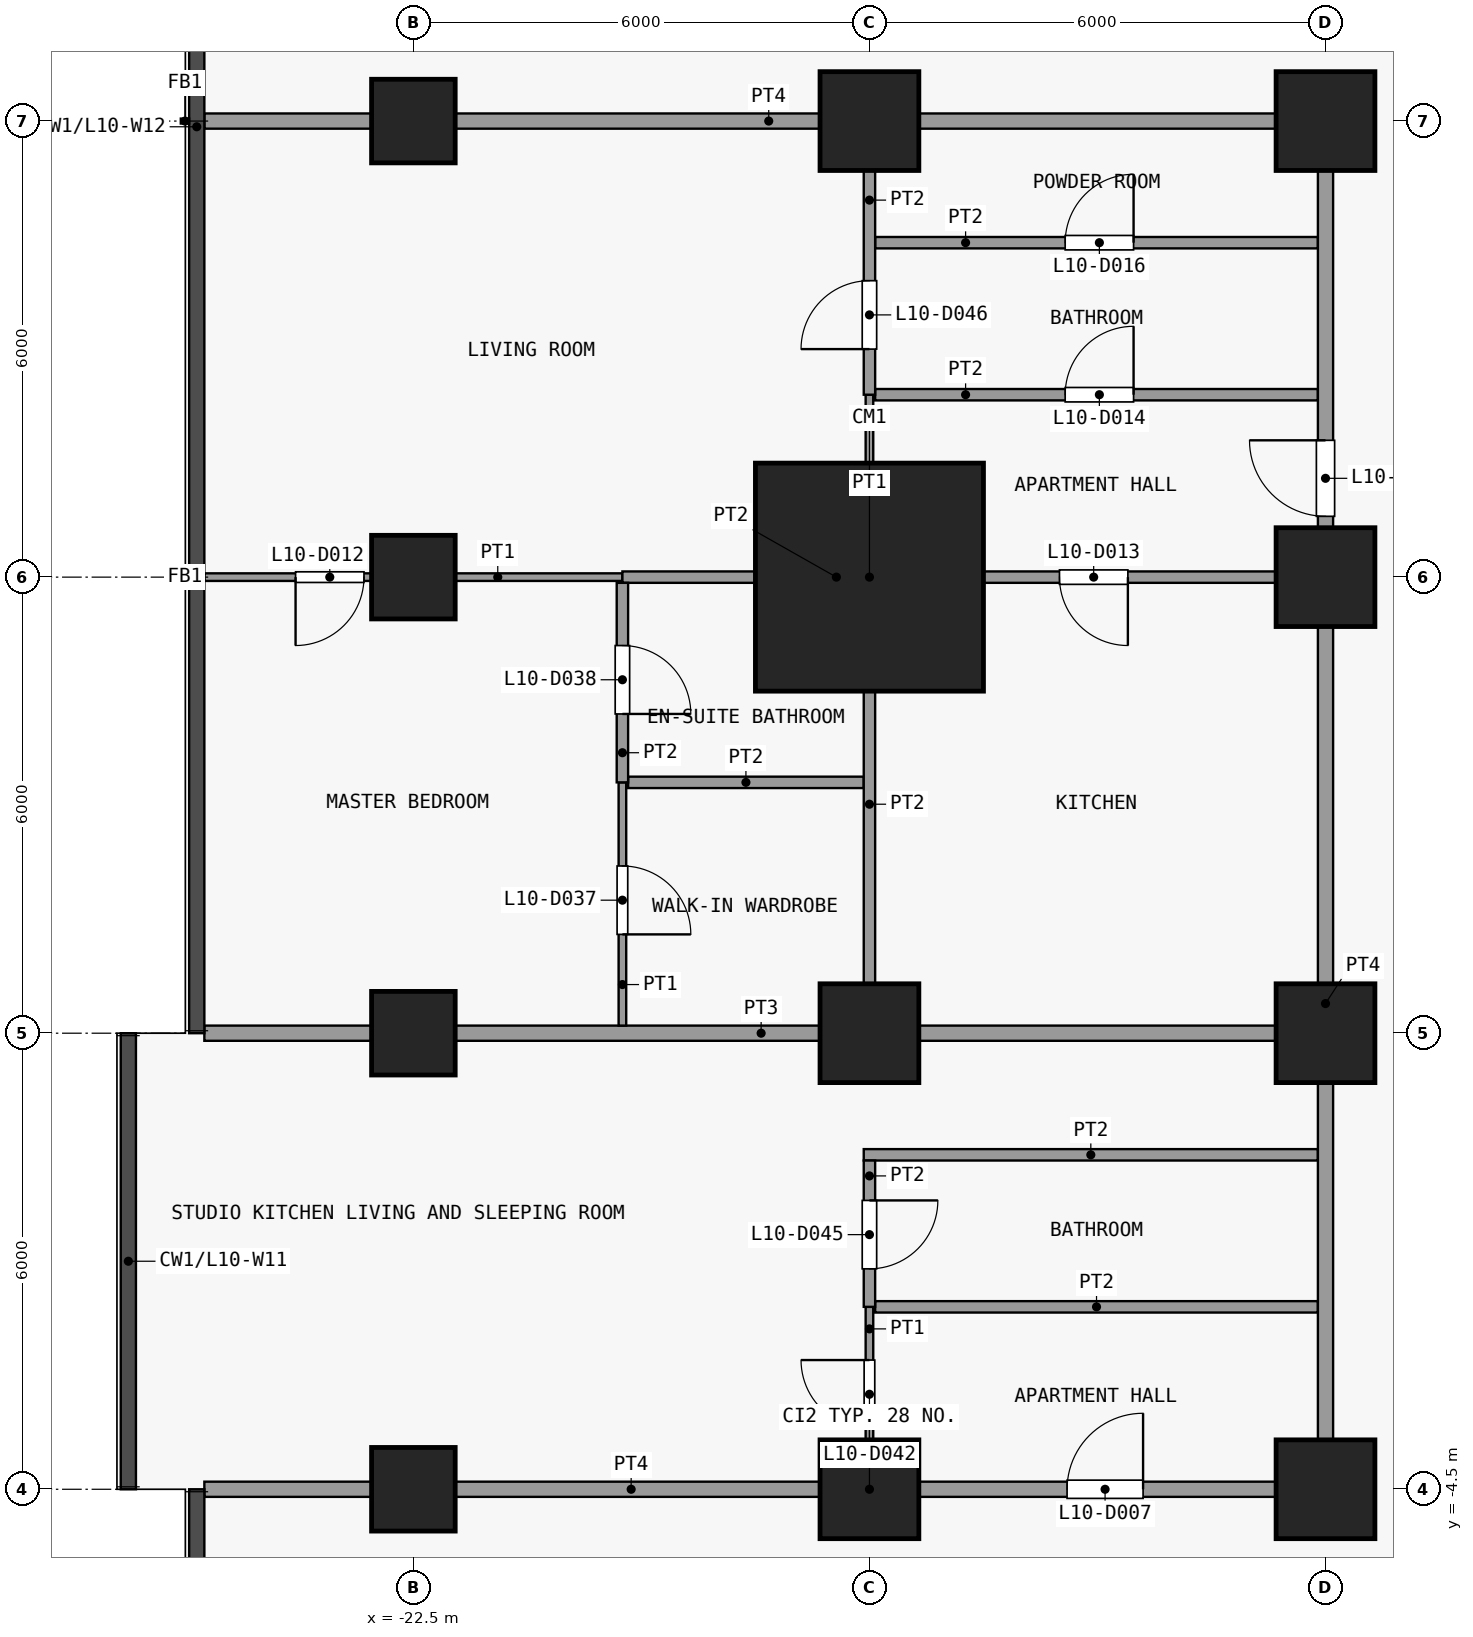
"""IFC4 building model, lengths in metres.
Left out: names, types, materials, properties, quantities, classifications, styles, units other than length and angle.
Written with IfcOpenShell. Run it as: python <this file> out.ifc"""

import sys

from ifc_helpers import new_model, si_unit, direction, frame, frame_2d, origin, origin_2d, place, context, subcontext, project, spatial, rectangle, extrude, element, fill, save


model = new_model("IFC4")
c1 = context("Model", 3, precision=1e-05, world=origin(), true_north=direction((0.0, 1.0)))
c2 = subcontext(c1, "Body", "Model", "MODEL_VIEW")
j1 = project(units=[si_unit("LENGTHUNIT", "METRE"), si_unit("PLANEANGLEUNIT", "RADIAN")], contexts=[c1])
p1 = place(None, origin())
s1 = spatial("IfcSite", under=j1, at=p1, CompositionType="ELEMENT")
p2 = place(p1, origin())
s2 = spatial("IfcBuilding", under=s1, at=p2, CompositionType="ELEMENT")
p3 = place(p2, frame((0.0, 0.0, 46.9)))
s3 = spatial("IfcBuildingStorey", under=s2, at=p3, CompositionType="ELEMENT", Elevation=46.9)
for number, where, z_axis, x_axis in (
    (1, (-22.5, -4.5, 0.0), (0.0, 0.0, 1.0), (1.0, 0.0, 0.0)),
    (2, (-22.5, 1.5, 0.0), (0.0, 0.0, 1.0), (1.0, 0.0, 0.0)),
    (3, (-22.5, 7.5, 0.0), (0.0, 0.0, 1.0), (1.0, 0.0, 0.0)),
    (4, (-22.5, 13.5, 0.0), (0.0, 0.0, 1.0), (1.0, 0.0, 0.0)),
):
    element("IfcColumn", number, at=place(p3, frame(where, z_axis=z_axis, x_axis=x_axis)), inside=s3, PredefinedType="COLUMN", context=c2, shape_type="SweptSolid", body=[
        extrude(rectangle(XDim=1.1, YDim=1.1, at=origin_2d()), origin(), (0.0, 0.0, 1.0), 3.6),
    ])
for number, where, z_axis, x_axis in (
    (5, (-16.5, -4.5, 0.0), (0.0, 0.0, 1.0), (1.0, 0.0, 0.0)),
    (6, (-16.5, 1.5, 0.0), (0.0, 0.0, 1.0), (1.0, 0.0, 0.0)),
):
    element("IfcColumn", number, at=place(p3, frame(where, z_axis=z_axis, x_axis=x_axis)), inside=s3, PredefinedType="COLUMN", context=c2, shape_type="SweptSolid", body=[
        extrude(rectangle(XDim=1.3, YDim=1.3, at=origin_2d()), origin(), (0.0, 0.0, 1.0), 3.6),
    ])
p4 = place(p3, frame((-16.5, 7.5, 0.0), z_axis=(0.0, 0.0, 1.0), x_axis=(1.0, 0.0, 0.0)))
e7 = element("IfcColumn", 7, at=p4, inside=s3, PredefinedType="COLUMN", context=c2, shape_type="SweptSolid", body=[
    extrude(rectangle(XDim=3.0, YDim=3.0, at=origin_2d()), origin(), (0.0, 0.0, 1.0), 3.6),
])
for number, where, z_axis, x_axis in (
    (8, (-16.5, 13.5, 0.0), (0.0, 0.0, 1.0), (1.0, 0.0, 0.0)),
    (9, (-10.5, -4.5, 0.0), (0.0, 0.0, 1.0), (1.0, 0.0, 0.0)),
    (10, (-10.5, 1.5, 0.0), (0.0, 0.0, 1.0), (1.0, 0.0, 0.0)),
    (11, (-10.5, 7.5, 0.0), (0.0, 0.0, 1.0), (1.0, 0.0, 0.0)),
    (12, (-10.5, 13.5, 0.0), (0.0, 0.0, 1.0), (1.0, 0.0, 0.0)),
):
    element("IfcColumn", number, at=place(p3, frame(where, z_axis=z_axis, x_axis=x_axis)), inside=s3, PredefinedType="COLUMN", context=c2, shape_type="SweptSolid", body=[
        extrude(rectangle(XDim=1.3, YDim=1.3, at=origin_2d()), origin(), (0.0, 0.0, 1.0), 3.6),
    ])
p5 = place(p3, frame((-25.25, -4.5, 0.0), z_axis=(0.0, 0.0, 1.0), x_axis=(1.0, 0.0, 0.0)))
e13 = element("IfcWall", 13, at=p5, inside=s3, PredefinedType="PARTITIONING", context=c2, shape_type="SweptSolid", body=[
    extrude(rectangle(XDim=14.85, YDim=0.2, at=frame_2d((7.425, 0.0))), origin(), (0.0, 0.0, 1.0), 3.3),
])
p6 = place(p5, frame((11.35, 0.0, 0.0)))
e14 = element("IfcOpeningElement", 14, at=p6, cuts=e13, PredefinedType="OPENING", context=c2, shape_type="SweptSolid", body=[
    extrude(rectangle(XDim=1.0, YDim=2.1, at=frame_2d((0.5, 1.05))), frame((0.0, 0.11, 0.0), z_axis=(0.0, -1.0, 0.0), x_axis=(1.0, 0.0, 0.0)), (0.0, 0.0, 1.0), 0.22),
])
p7 = place(p3, frame((-16.425, -2.1, 0.0), z_axis=(0.0, 0.0, 1.0), x_axis=(1.0, 0.0, 0.0)))
e15 = element("IfcWall", 15, at=p7, inside=s3, PredefinedType="PARTITIONING", context=c2, shape_type="SweptSolid", body=[
    extrude(rectangle(XDim=5.825, YDim=0.15, at=frame_2d((2.913, 0.0))), origin(), (0.0, 0.0, 1.0), 3.3),
])
p8 = place(p3, frame((-16.575, -0.1, 0.0), z_axis=(0.0, 0.0, 1.0), x_axis=(1.0, 0.0, 0.0)))
e16 = element("IfcWall", 16, at=p8, inside=s3, PredefinedType="PARTITIONING", context=c2, shape_type="SweptSolid", body=[
    extrude(rectangle(XDim=5.975, YDim=0.15, at=frame_2d((2.987, 0.0))), origin(), (0.0, 0.0, 1.0), 3.3),
])
p9 = place(p3, frame((-25.25, 1.5, 0.0), z_axis=(0.0, 0.0, 1.0), x_axis=(1.0, 0.0, 0.0)))
e17 = element("IfcWall", 17, at=p9, inside=s3, PredefinedType="PARTITIONING", context=c2, shape_type="SweptSolid", body=[
    extrude(rectangle(XDim=14.65, YDim=0.2, at=frame_2d((7.325, 0.0))), origin(), (0.0, 0.0, 1.0), 3.3),
])
p10 = place(p3, frame((-19.675, 4.8, 0.0), z_axis=(0.0, 0.0, 1.0), x_axis=(1.0, 0.0, 0.0)))
e18 = element("IfcWall", 18, at=p10, inside=s3, PredefinedType="PARTITIONING", context=c2, shape_type="SweptSolid", body=[
    extrude(rectangle(XDim=3.1, YDim=0.15, at=frame_2d((1.55, 0.0))), origin(), (0.0, 0.0, 1.0), 3.3),
])
p11 = place(p3, frame((-25.25, 7.5, 0.0), z_axis=(0.0, 0.0, 1.0), x_axis=(1.0, 0.0, 0.0)))
e19 = element("IfcWall", 19, at=p11, inside=s3, PredefinedType="PARTITIONING", context=c2, shape_type="SweptSolid", body=[
    extrude(rectangle(XDim=5.5, YDim=0.1, at=frame_2d((2.75, 0.0))), origin(), (0.0, 0.0, 1.0), 3.3),
])
p12 = place(p11, frame((1.2, 0.0, 0.0)))
e20 = element("IfcOpeningElement", 20, at=p12, cuts=e19, PredefinedType="OPENING", context=c2, shape_type="SweptSolid", body=[
    extrude(rectangle(XDim=0.9, YDim=2.1, at=frame_2d((0.45, 1.05))), frame((0.0, 0.06, 0.0), z_axis=(0.0, -1.0, 0.0), x_axis=(1.0, 0.0, 0.0)), (0.0, 0.0, 1.0), 0.12),
])
p13 = place(p3, frame((-19.75, 7.5, 0.0), z_axis=(0.0, 0.0, 1.0), x_axis=(1.0, 0.0, 0.0)))
e21 = element("IfcWall", 21, at=p13, inside=s3, PredefinedType="PARTITIONING", context=c2, shape_type="SweptSolid", body=[
    extrude(rectangle(XDim=9.15, YDim=0.15, at=frame_2d((4.575, 0.0))), origin(), (0.0, 0.0, 1.0), 3.3),
])
p14 = place(p13, frame((5.75, 0.0, 0.0)))
e22 = element("IfcOpeningElement", 22, at=p14, cuts=e21, PredefinedType="OPENING", context=c2, shape_type="SweptSolid", body=[
    extrude(rectangle(XDim=0.9, YDim=2.1, at=frame_2d((0.45, 1.05))), frame((0.0, 0.085, 0.0), z_axis=(0.0, -1.0, 0.0), x_axis=(1.0, 0.0, 0.0)), (0.0, 0.0, 1.0), 0.17),
])
p15 = place(p3, frame((-16.425, 9.9, 0.0), z_axis=(0.0, 0.0, 1.0), x_axis=(1.0, 0.0, 0.0)))
e23 = element("IfcWall", 23, at=p15, inside=s3, PredefinedType="PARTITIONING", context=c2, shape_type="SweptSolid", body=[
    extrude(rectangle(XDim=5.825, YDim=0.15, at=frame_2d((2.913, 0.0))), origin(), (0.0, 0.0, 1.0), 3.3),
])
p16 = place(p15, frame((2.5, 0.0, 0.0)))
e24 = element("IfcOpeningElement", 24, at=p16, cuts=e23, PredefinedType="OPENING", context=c2, shape_type="SweptSolid", body=[
    extrude(rectangle(XDim=0.9, YDim=2.1, at=frame_2d((0.45, 1.05))), frame((0.0, 0.085, 0.0), z_axis=(0.0, -1.0, 0.0), x_axis=(1.0, 0.0, 0.0)), (0.0, 0.0, 1.0), 0.17),
])
p17 = place(p3, frame((-16.425, 11.9, 0.0), z_axis=(0.0, 0.0, 1.0), x_axis=(1.0, 0.0, 0.0)))
e25 = element("IfcWall", 25, at=p17, inside=s3, PredefinedType="PARTITIONING", context=c2, shape_type="SweptSolid", body=[
    extrude(rectangle(XDim=5.825, YDim=0.15, at=frame_2d((2.913, 0.0))), origin(), (0.0, 0.0, 1.0), 3.3),
])
p18 = place(p17, frame((2.5, 0.0, 0.0)))
e26 = element("IfcOpeningElement", 26, at=p18, cuts=e25, PredefinedType="OPENING", context=c2, shape_type="SweptSolid", body=[
    extrude(rectangle(XDim=0.9, YDim=2.1, at=frame_2d((0.45, 1.05))), frame((0.0, 0.085, 0.0), z_axis=(0.0, -1.0, 0.0), x_axis=(1.0, 0.0, 0.0)), (0.0, 0.0, 1.0), 0.17),
])
p19 = place(p3, frame((-25.25, 13.5, 0.0), z_axis=(0.0, 0.0, 1.0), x_axis=(1.0, 0.0, 0.0)))
e27 = element("IfcWall", 27, at=p19, inside=s3, PredefinedType="PARTITIONING", context=c2, shape_type="SweptSolid", body=[
    extrude(rectangle(XDim=14.85, YDim=0.2, at=frame_2d((7.425, 0.0))), origin(), (0.0, 0.0, 1.0), 3.3),
])
p20 = place(p3, frame((-19.75, 1.6, 0.0), z_axis=(0.0, 0.0, 1.0), x_axis=(0.0, 1.0, 0.0)))
e28 = element("IfcWall", 28, at=p20, inside=s3, PredefinedType="PARTITIONING", context=c2, shape_type="SweptSolid", body=[
    extrude(rectangle(XDim=3.2, YDim=0.1, at=frame_2d((1.6, 0.0))), origin(), (0.0, 0.0, 1.0), 3.3),
])
p21 = place(p20, frame((1.2, 0.0, 0.0)))
e29 = element("IfcOpeningElement", 29, at=p21, cuts=e28, PredefinedType="OPENING", context=c2, shape_type="SweptSolid", body=[
    extrude(rectangle(XDim=0.9, YDim=2.1, at=frame_2d((0.45, 1.05))), frame((0.0, 0.06, 0.0), z_axis=(0.0, -1.0, 0.0), x_axis=(1.0, 0.0, 0.0)), (0.0, 0.0, 1.0), 0.12),
])
p22 = place(p3, frame((-19.75, 4.8, 0.0), z_axis=(0.0, 0.0, 1.0), x_axis=(0.0, 1.0, 0.0)))
e30 = element("IfcWall", 30, at=p22, inside=s3, PredefinedType="PARTITIONING", context=c2, shape_type="SweptSolid", body=[
    extrude(rectangle(XDim=2.625, YDim=0.15, at=frame_2d((1.312, 0.0))), origin(), (0.0, 0.0, 1.0), 3.3),
])
p23 = place(p22, frame((0.9, 0.0, 0.0)))
e31 = element("IfcOpeningElement", 31, at=p23, cuts=e30, PredefinedType="OPENING", context=c2, shape_type="SweptSolid", body=[
    extrude(rectangle(XDim=0.9, YDim=2.1, at=frame_2d((0.45, 1.05))), frame((0.0, 0.085, 0.0), z_axis=(0.0, -1.0, 0.0), x_axis=(1.0, 0.0, 0.0)), (0.0, 0.0, 1.0), 0.17),
])
p24 = place(p3, frame((-16.5, -4.4, 0.0), z_axis=(0.0, 0.0, 1.0), x_axis=(0.0, 1.0, 0.0)))
e32 = element("IfcWall", 32, at=p24, inside=s3, PredefinedType="PARTITIONING", context=c2, shape_type="SweptSolid", body=[
    extrude(rectangle(XDim=2.3, YDim=0.1, at=frame_2d((1.15, 0.0))), origin(), (0.0, 0.0, 1.0), 3.3),
])
p25 = place(p24, frame((0.7, 0.0, 0.0)))
e33 = element("IfcOpeningElement", 33, at=p25, cuts=e32, PredefinedType="OPENING", context=c2, shape_type="SweptSolid", body=[
    extrude(rectangle(XDim=0.9, YDim=2.1, at=frame_2d((0.45, 1.05))), frame((0.0, 0.06, 0.0), z_axis=(0.0, -1.0, 0.0), x_axis=(1.0, 0.0, 0.0)), (0.0, 0.0, 1.0), 0.12),
])
p26 = place(p3, frame((-16.5, 7.575, 0.0), z_axis=(0.0, 0.0, 1.0), x_axis=(0.0, 1.0, 0.0)))
e34 = element("IfcWall", 34, at=p26, inside=s3, PredefinedType="PARTITIONING", context=c2, shape_type="SweptSolid", body=[
    extrude(rectangle(XDim=2.325, YDim=0.1, at=frame_2d((1.163, 0.0))), origin(), (0.0, 0.0, 1.0), 3.3),
])
p27 = place(p3, frame((-16.5, -2.1, 0.0), z_axis=(0.0, 0.0, 1.0), x_axis=(0.0, 1.0, 0.0)))
e35 = element("IfcWall", 35, at=p27, inside=s3, PredefinedType="PARTITIONING", context=c2, shape_type="SweptSolid", body=[
    extrude(rectangle(XDim=1.925, YDim=0.15, at=frame_2d((0.962, 0.0))), origin(), (0.0, 0.0, 1.0), 3.3),
])
p28 = place(p27, frame((0.5, 0.0, 0.0)))
e36 = element("IfcOpeningElement", 36, at=p28, cuts=e35, PredefinedType="OPENING", context=c2, shape_type="SweptSolid", body=[
    extrude(rectangle(XDim=0.9, YDim=2.1, at=frame_2d((0.45, 1.05))), frame((0.0, 0.085, 0.0), z_axis=(0.0, -1.0, 0.0), x_axis=(1.0, 0.0, 0.0)), (0.0, 0.0, 1.0), 0.17),
])
p29 = place(p3, frame((-16.5, 1.6, 0.0), z_axis=(0.0, 0.0, 1.0), x_axis=(0.0, 1.0, 0.0)))
e37 = element("IfcWall", 37, at=p29, inside=s3, PredefinedType="PARTITIONING", context=c2, shape_type="SweptSolid", body=[
    extrude(rectangle(XDim=5.825, YDim=0.15, at=frame_2d((2.913, 0.0))), origin(), (0.0, 0.0, 1.0), 3.3),
])
p30 = place(p3, frame((-16.5, 9.9, 0.0), z_axis=(0.0, 0.0, 1.0), x_axis=(0.0, 1.0, 0.0)))
e38 = element("IfcWall", 38, at=p30, inside=s3, PredefinedType="PARTITIONING", context=c2, shape_type="SweptSolid", body=[
    extrude(rectangle(XDim=3.5, YDim=0.15, at=frame_2d((1.75, 0.0))), origin(), (0.0, 0.0, 1.0), 3.3),
])
p31 = place(p30, frame((0.6, 0.0, 0.0)))
e39 = element("IfcOpeningElement", 39, at=p31, cuts=e38, PredefinedType="OPENING", context=c2, shape_type="SweptSolid", body=[
    extrude(rectangle(XDim=0.9, YDim=2.1, at=frame_2d((0.45, 1.05))), frame((0.0, 0.085, 0.0), z_axis=(0.0, -1.0, 0.0), x_axis=(1.0, 0.0, 0.0)), (0.0, 0.0, 1.0), 0.17),
])
p32 = place(p3, frame((-10.5, -4.4, 0.0), z_axis=(0.0, 0.0, 1.0), x_axis=(0.0, 1.0, 0.0)))
e40 = element("IfcWall", 40, at=p32, inside=s3, PredefinedType="PARTITIONING", context=c2, shape_type="SweptSolid", body=[
    extrude(rectangle(XDim=17.8, YDim=0.2, at=frame_2d((8.9, 0.0))), origin(), (0.0, 0.0, 1.0), 3.3),
])
p33 = place(p32, frame((12.7, 0.0, 0.0)))
e41 = element("IfcOpeningElement", 41, at=p33, cuts=e40, PredefinedType="OPENING", context=c2, shape_type="SweptSolid", body=[
    extrude(rectangle(XDim=1.0, YDim=2.1, at=frame_2d((0.5, 1.05))), frame((0.0, 0.11, 0.0), z_axis=(0.0, -1.0, 0.0), x_axis=(1.0, 0.0, 0.0)), (0.0, 0.0, 1.0), 0.22),
])
p34 = place(p6, origin())
e42 = element("IfcDoor", 42, at=p34, inside=s3, OperationType="SINGLE_SWING_LEFT", PredefinedType="DOOR", context=c2, shape_type="SweptSolid", body=[
    extrude(rectangle(XDim=1.0, YDim=2.1, at=frame_2d((0.5, 1.05))), frame((0.0, 0.025, 0.0), z_axis=(0.0, -1.0, 0.0), x_axis=(1.0, 0.0, 0.0)), (0.0, 0.0, 1.0), 0.05),
])
fill(e14, e42)
p35 = place(p12, origin())
e43 = element("IfcDoor", 43, at=p35, inside=s3, OperationType="SINGLE_SWING_LEFT", PredefinedType="DOOR", context=c2, shape_type="SweptSolid", body=[
    extrude(rectangle(XDim=0.9, YDim=2.1, at=frame_2d((0.45, 1.05))), frame((0.0, 0.025, 0.0), z_axis=(0.0, -1.0, 0.0), x_axis=(1.0, 0.0, 0.0)), (0.0, 0.0, 1.0), 0.05),
])
fill(e20, e43)
p36 = place(p14, origin())
e44 = element("IfcDoor", 44, at=p36, inside=s3, OperationType="SINGLE_SWING_RIGHT", PredefinedType="DOOR", context=c2, shape_type="SweptSolid", body=[
    extrude(rectangle(XDim=0.9, YDim=2.1, at=frame_2d((0.45, 1.05))), frame((0.0, 0.025, 0.0), z_axis=(0.0, -1.0, 0.0), x_axis=(1.0, 0.0, 0.0)), (0.0, 0.0, 1.0), 0.05),
])
fill(e22, e44)
p37 = place(p16, origin())
e45 = element("IfcDoor", 45, at=p37, inside=s3, OperationType="SINGLE_SWING_LEFT", PredefinedType="DOOR", context=c2, shape_type="SweptSolid", body=[
    extrude(rectangle(XDim=0.9, YDim=2.1, at=frame_2d((0.45, 1.05))), frame((0.0, 0.025, 0.0), z_axis=(0.0, -1.0, 0.0), x_axis=(1.0, 0.0, 0.0)), (0.0, 0.0, 1.0), 0.05),
])
fill(e24, e45)
p38 = place(p18, origin())
e46 = element("IfcDoor", 46, at=p38, inside=s3, OperationType="SINGLE_SWING_LEFT", PredefinedType="DOOR", context=c2, shape_type="SweptSolid", body=[
    extrude(rectangle(XDim=0.9, YDim=2.1, at=frame_2d((0.45, 1.05))), frame((0.0, 0.025, 0.0), z_axis=(0.0, -1.0, 0.0), x_axis=(1.0, 0.0, 0.0)), (0.0, 0.0, 1.0), 0.05),
])
fill(e26, e46)
p39 = place(p21, origin())
e47 = element("IfcDoor", 47, at=p39, inside=s3, OperationType="SINGLE_SWING_LEFT", PredefinedType="DOOR", context=c2, shape_type="SweptSolid", body=[
    extrude(rectangle(XDim=0.9, YDim=2.1, at=frame_2d((0.45, 1.05))), frame((0.0, 0.025, 0.0), z_axis=(0.0, -1.0, 0.0), x_axis=(1.0, 0.0, 0.0)), (0.0, 0.0, 1.0), 0.05),
])
fill(e29, e47)
p40 = place(p23, origin())
e48 = element("IfcDoor", 48, at=p40, inside=s3, OperationType="SINGLE_SWING_LEFT", PredefinedType="DOOR", context=c2, shape_type="SweptSolid", body=[
    extrude(rectangle(XDim=0.9, YDim=2.1, at=frame_2d((0.45, 1.05))), frame((0.0, 0.025, 0.0), z_axis=(0.0, -1.0, 0.0), x_axis=(1.0, 0.0, 0.0)), (0.0, 0.0, 1.0), 0.05),
])
fill(e31, e48)
p41 = place(p25, origin())
e49 = element("IfcDoor", 49, at=p41, inside=s3, OperationType="SINGLE_SWING_LEFT", PredefinedType="DOOR", context=c2, shape_type="SweptSolid", body=[
    extrude(rectangle(XDim=0.9, YDim=2.1, at=frame_2d((0.45, 1.05))), frame((0.0, 0.025, 0.0), z_axis=(0.0, -1.0, 0.0), x_axis=(1.0, 0.0, 0.0)), (0.0, 0.0, 1.0), 0.05),
])
fill(e33, e49)
p42 = place(p28, origin())
e50 = element("IfcDoor", 50, at=p42, inside=s3, OperationType="SINGLE_SWING_RIGHT", PredefinedType="DOOR", context=c2, shape_type="SweptSolid", body=[
    extrude(rectangle(XDim=0.9, YDim=2.1, at=frame_2d((0.45, 1.05))), frame((0.0, 0.025, 0.0), z_axis=(0.0, -1.0, 0.0), x_axis=(1.0, 0.0, 0.0)), (0.0, 0.0, 1.0), 0.05),
])
fill(e36, e50)
p43 = place(p31, origin())
e51 = element("IfcDoor", 51, at=p43, inside=s3, OperationType="SINGLE_SWING_RIGHT", PredefinedType="DOOR", context=c2, shape_type="SweptSolid", body=[
    extrude(rectangle(XDim=0.9, YDim=2.1, at=frame_2d((0.45, 1.05))), frame((0.0, 0.025, 0.0), z_axis=(0.0, -1.0, 0.0), x_axis=(1.0, 0.0, 0.0)), (0.0, 0.0, 1.0), 0.05),
])
fill(e39, e51)
p44 = place(p33, origin())
e52 = element("IfcDoor", 52, at=p44, inside=s3, OperationType="SINGLE_SWING_LEFT", PredefinedType="DOOR", context=c2, shape_type="SweptSolid", body=[
    extrude(rectangle(XDim=1.0, YDim=2.1, at=frame_2d((0.5, 1.05))), frame((0.0, 0.025, 0.0), z_axis=(0.0, -1.0, 0.0), x_axis=(1.0, 0.0, 0.0)), (0.0, 0.0, 1.0), 0.05),
])
fill(e41, e52)
save(model, sys.argv[1])
